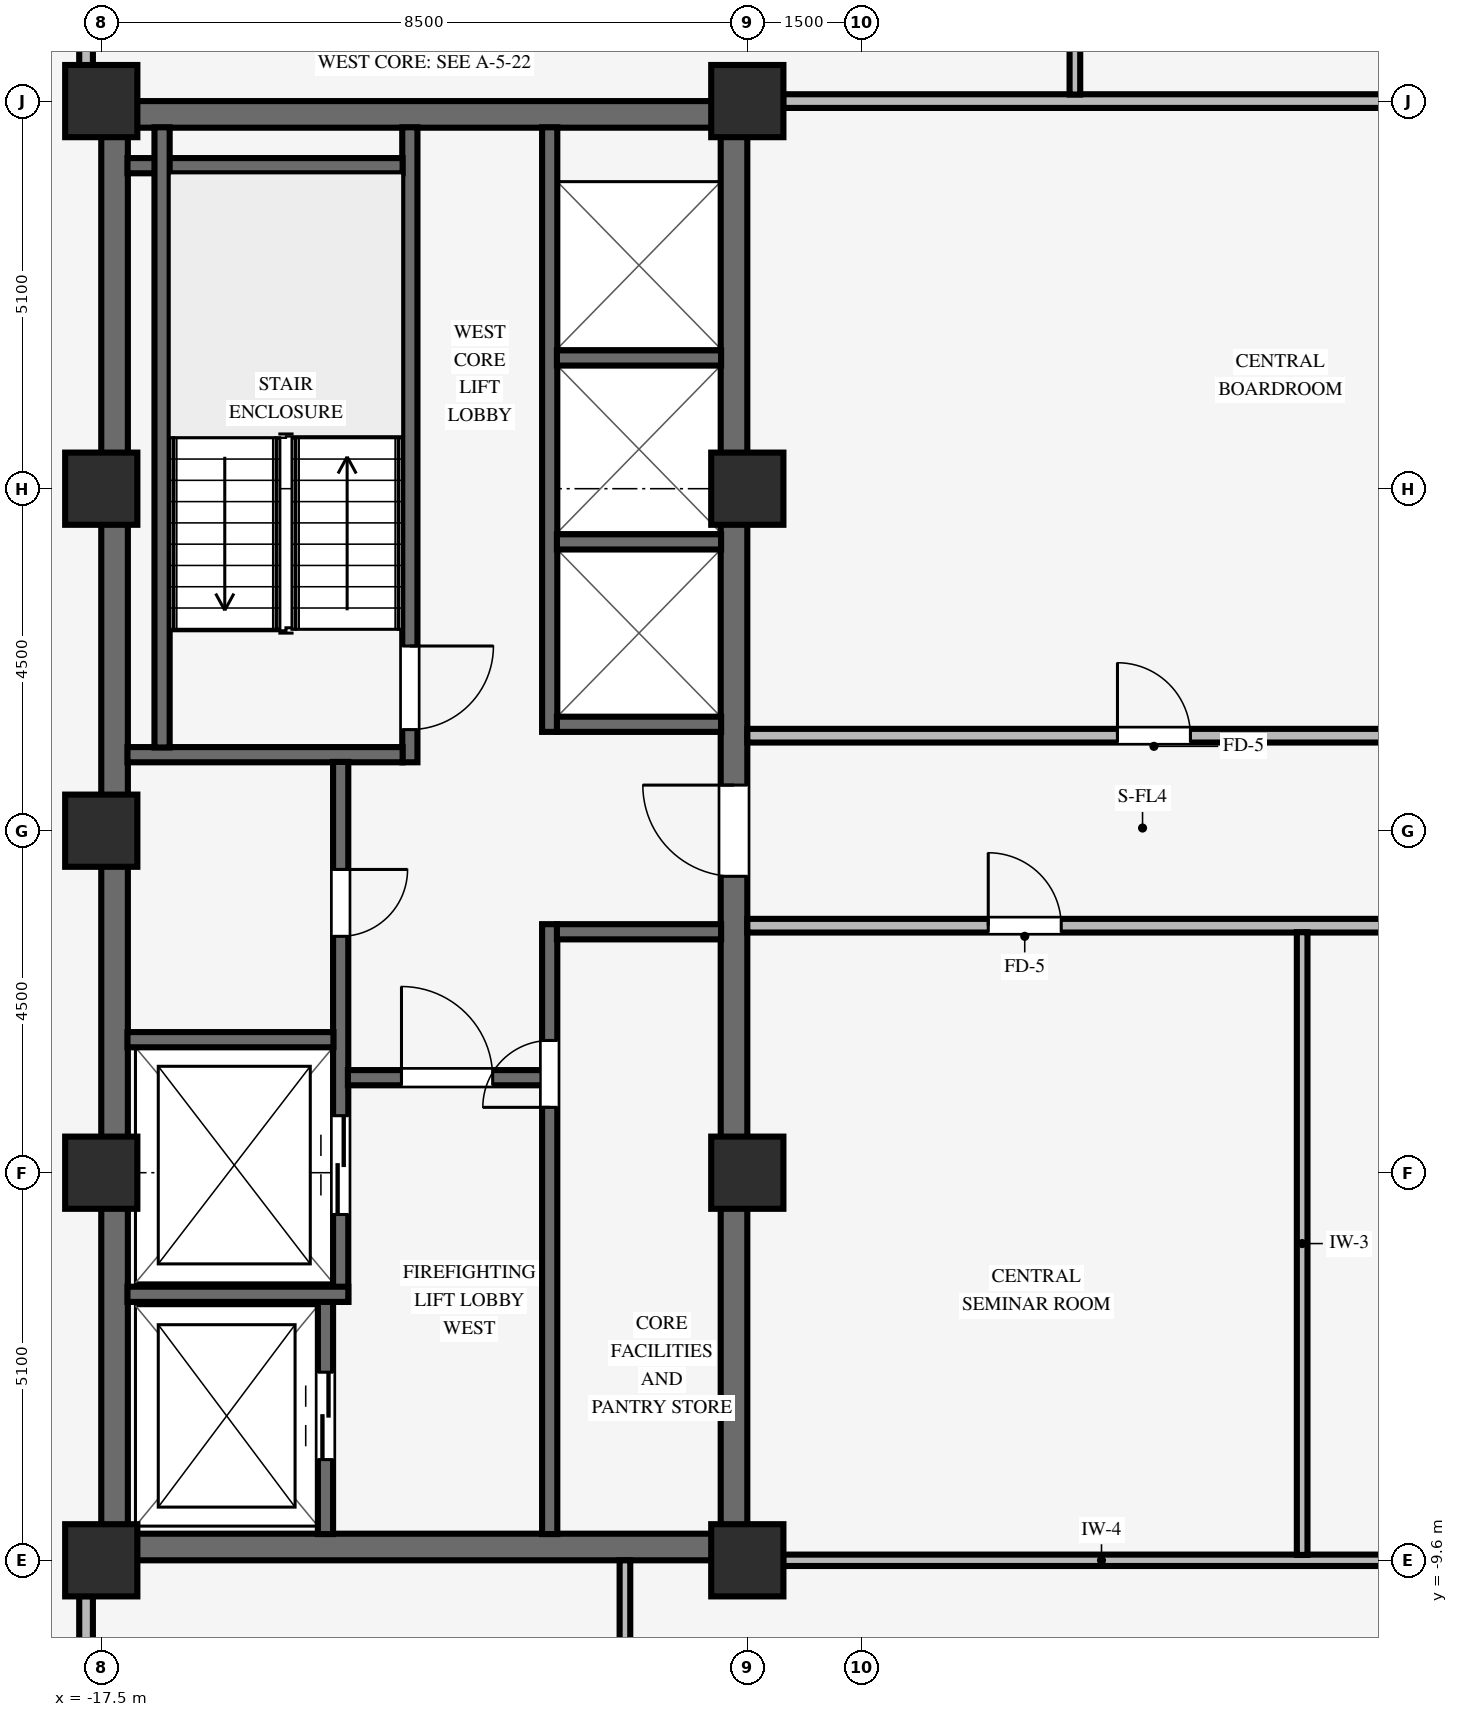
"""IFC4 building model, lengths in metres.
Left out: names, types, materials, properties, quantities, classifications, styles, units other than length and angle.
Written with IfcOpenShell. Run it as: python <this file> out.ifc"""

import sys

from ifc_helpers import new_model, si_unit, direction, frame, frame_2d, origin, origin_2d, place, context, subcontext, project, spatial, rectangle, extrude, source, transform, mapped, element, fill, save


model = new_model("IFC4")
c1 = context("Model", 3, precision=1e-05, world=origin(), true_north=direction((0.0, 1.0)))
c2 = subcontext(c1, "Body", "Model", "MODEL_VIEW")
j1 = project(units=[si_unit("LENGTHUNIT", "METRE"), si_unit("PLANEANGLEUNIT", "RADIAN")], contexts=[c1])
p1 = place(None, origin())
s1 = spatial("IfcSite", under=j1, at=p1, CompositionType="ELEMENT")
p2 = place(p1, origin())
s2 = spatial("IfcBuilding", under=s1, at=p2, CompositionType="ELEMENT")
p3 = place(p2, frame((0.0, 0.0, 212.8)))
s3 = spatial("IfcBuildingStorey", under=s2, at=p3, CompositionType="ELEMENT", Elevation=212.8)
for number, where, z_axis, x_axis in (
    (1, (-17.5, -9.425, 0.0), (0.0, 0.0, 1.0), (1.0, 0.0, 0.0)),
    (2, (-17.5, 9.425, 0.0), (0.0, 0.0, 1.0), (1.0, 0.0, 0.0)),
):
    element("IfcWall", number, at=place(p3, frame(where, z_axis=z_axis, x_axis=x_axis)), inside=s3, PredefinedType="SHEAR", context=c2, shape_type="SweptSolid", body=[
        extrude(rectangle(XDim=8.5, YDim=0.35, at=frame_2d((4.25, 0.0))), origin(), (0.0, 0.0, 1.0), 3.37),
    ])
p4 = place(p3, frame((-17.325, -9.255, 0.0), z_axis=(0.0, 0.0, 1.0), x_axis=(0.0, 1.0, 0.0)))
e3 = element("IfcWall", 3, at=p4, inside=s3, PredefinedType="SHEAR", context=c2, shape_type="SweptSolid", body=[
    extrude(rectangle(XDim=18.51, YDim=0.35, at=frame_2d((9.255, 0.0))), origin(), (0.0, 0.0, 1.0), 3.37),
])
p5 = place(p3, frame((-9.175, -9.255, 0.0), z_axis=(0.0, 0.0, 1.0), x_axis=(0.0, 1.0, 0.0)))
e4 = element("IfcWall", 4, at=p5, inside=s3, PredefinedType="SHEAR", context=c2, shape_type="SweptSolid", body=[
    extrude(rectangle(XDim=18.51, YDim=0.35, at=frame_2d((9.255, 0.0))), origin(), (0.0, 0.0, 1.0), 3.37),
])
p6 = place(p5, frame((8.655, 0.0, 0.0)))
e5 = element("IfcOpeningElement", 5, at=p6, cuts=e4, PredefinedType="OPENING", context=c2, shape_type="SweptSolid", body=[
    extrude(rectangle(XDim=1.2, YDim=2.15, at=frame_2d((0.6, 1.075))), frame((0.0, 0.185, 0.0), z_axis=(0.0, -1.0, 0.0), x_axis=(1.0, 0.0, 0.0)), (0.0, 0.0, 1.0), 0.37),
])
for number, where, z_axis, x_axis in (
    (6, (-17.5, -9.6, 0.0), (0.0, 0.0, 1.0), (1.0, 0.0, 0.0)),
    (7, (-17.5, -4.5, 0.0), (0.0, 0.0, 1.0), (1.0, 0.0, 0.0)),
    (8, (-17.5, 4.5, 0.0), (0.0, 0.0, 1.0), (1.0, 0.0, 0.0)),
    (9, (-17.5, 9.6, 0.0), (0.0, 0.0, 1.0), (1.0, 0.0, 0.0)),
    (10, (-9.0, -9.6, 0.0), (0.0, 0.0, 1.0), (1.0, 0.0, 0.0)),
    (11, (-9.0, -4.5, 0.0), (0.0, 0.0, 1.0), (1.0, 0.0, 0.0)),
    (12, (-9.0, 4.5, 0.0), (0.0, 0.0, 1.0), (1.0, 0.0, 0.0)),
    (13, (-9.0, 9.6, 0.0), (0.0, 0.0, 1.0), (1.0, 0.0, 0.0)),
    (14, (-17.5, 0.0, 0.0), (0.0, 0.0, 1.0), (1.0, 0.0, 0.0)),
):
    element("IfcColumn", number, at=place(p3, frame(where, z_axis=z_axis, x_axis=x_axis)), inside=s3, PredefinedType="COLUMN", context=c2, shape_type="SweptSolid", body=[
        extrude(rectangle(XDim=0.95, YDim=0.95, at=origin_2d()), origin(), (0.0, 0.0, 1.0), 3.37),
    ])
p7 = place(p3, frame((-13.44, 0.9, 0.0), z_axis=(0.0, 0.0, 1.0), x_axis=(0.0, 1.0, 0.0)))
e15 = element("IfcWall", 15, at=p7, inside=s3, PredefinedType="SHEAR", context=c2, shape_type="SweptSolid", body=[
    extrude(rectangle(XDim=8.355, YDim=0.2, at=frame_2d((4.177, 0.0))), origin(), (0.0, 0.0, 1.0), 3.37),
])
p8 = place(p7, frame((1.53, 0.0, 0.0), z_axis=(0.0, 0.0, 1.0), x_axis=(-1.0, 0.0, 0.0)))
e16 = element("IfcOpeningElement", 16, at=p8, cuts=e15, PredefinedType="OPENING", context=c2, shape_type="SweptSolid", body=[
    extrude(rectangle(XDim=1.1, YDim=2.15, at=frame_2d((0.55, 1.075))), frame((0.0, 0.11, 0.0), z_axis=(0.0, -1.0, 0.0), x_axis=(1.0, 0.0, 0.0)), (0.0, 0.0, 1.0), 0.22),
])
for number, where, z_axis, x_axis in (
    (17, (-17.155, 1.0, 0.0), (0.0, 0.0, 1.0), (1.0, 0.0, 0.0)),
    (18, (-17.155, 8.75, 0.0), (0.0, 0.0, 1.0), (1.0, 0.0, 0.0)),
):
    element("IfcWall", number, at=place(p3, frame(where, z_axis=z_axis, x_axis=x_axis)), inside=s3, PredefinedType="SHEAR", context=c2, shape_type="SweptSolid", body=[
        extrude(rectangle(XDim=3.62, YDim=0.2, at=frame_2d((1.81, 0.0))), origin(), (0.0, 0.0, 1.0), 3.37),
    ])
p9 = place(p3, frame((-16.7, 1.095, 0.0), z_axis=(0.0, 0.0, 1.0), x_axis=(0.0, 1.0, 0.0)))
e19 = element("IfcWall", 19, at=p9, inside=s3, PredefinedType="SHEAR", context=c2, shape_type="SweptSolid", body=[
    extrude(rectangle(XDim=8.16, YDim=0.2, at=frame_2d((4.08, 0.0))), origin(), (0.0, 0.0, 1.0), 3.37),
])
p10 = place(p3, frame((-14.55, -9.255, 0.0), z_axis=(0.0, 0.0, 1.0), x_axis=(0.0, 1.0, 0.0)))
e20 = element("IfcWall", 20, at=p10, inside=s3, PredefinedType="SHEAR", context=c2, shape_type="SweptSolid", body=[
    extrude(rectangle(XDim=3.06, YDim=0.2, at=frame_2d((1.53, 0.0))), origin(), (0.0, 0.0, 1.0), 3.37),
])
p11 = place(p10, frame((0.98, 0.0, 0.0)))
e21 = element("IfcOpeningElement", 21, at=p11, cuts=e20, PredefinedType="OPENING", context=c2, shape_type="SweptSolid", body=[
    extrude(rectangle(XDim=1.15, YDim=2.15, at=frame_2d((0.575, 1.075))), frame((0.0, 0.11, 0.0), z_axis=(0.0, -1.0, 0.0), x_axis=(1.0, 0.0, 0.0)), (0.0, 0.0, 1.0), 0.22),
])
p12 = place(p3, frame((-14.35, -6.2, 0.0), z_axis=(0.0, 0.0, 1.0), x_axis=(0.0, 1.0, 0.0)))
e22 = element("IfcWall", 22, at=p12, inside=s3, PredefinedType="SHEAR", context=c2, shape_type="SweptSolid", body=[
    extrude(rectangle(XDim=7.105, YDim=0.2, at=frame_2d((3.552, 0.0))), origin(), (0.0, 0.0, 1.0), 3.37),
])
p13 = place(p12, frame((5.69, 0.0, 0.0), z_axis=(0.0, 0.0, 1.0), x_axis=(-1.0, 0.0, 0.0)))
e23 = element("IfcOpeningElement", 23, at=p13, cuts=e22, PredefinedType="OPENING", context=c2, shape_type="SweptSolid", body=[
    extrude(rectangle(XDim=0.88, YDim=2.1, at=frame_2d((0.44, 1.05))), frame((0.0, 0.11, 0.0), z_axis=(0.0, -1.0, 0.0), x_axis=(1.0, 0.0, 0.0)), (0.0, 0.0, 1.0), 0.22),
])
p14 = place(p12, frame((1.15, 0.0, 0.0)))
e24 = element("IfcOpeningElement", 24, at=p14, cuts=e22, PredefinedType="OPENING", context=c2, shape_type="SweptSolid", body=[
    extrude(rectangle(XDim=1.3, YDim=2.2, at=frame_2d((0.65, 1.1))), frame((0.0, 0.11, 0.0), z_axis=(0.0, -1.0, 0.0), x_axis=(1.0, 0.0, 0.0)), (0.0, 0.0, 1.0), 0.22),
])
p15 = place(p3, frame((-17.155, -6.1, 0.0), z_axis=(0.0, 0.0, 1.0), x_axis=(1.0, 0.0, 0.0)))
e25 = element("IfcWall", 25, at=p15, inside=s3, PredefinedType="SHEAR", context=c2, shape_type="SweptSolid", body=[
    extrude(rectangle(XDim=2.905, YDim=0.2, at=frame_2d((1.453, 0.0))), origin(), (0.0, 0.0, 1.0), 3.37),
])
p16 = place(p3, frame((-17.155, -2.75, 0.0), z_axis=(0.0, 0.0, 1.0), x_axis=(1.0, 0.0, 0.0)))
e26 = element("IfcWall", 26, at=p16, inside=s3, PredefinedType="SHEAR", context=c2, shape_type="SweptSolid", body=[
    extrude(rectangle(XDim=2.71, YDim=0.2, at=frame_2d((1.355, 0.0))), origin(), (0.0, 0.0, 1.0), 3.37),
])
p17 = place(p3, frame((-11.6, -9.255, 0.0), z_axis=(0.0, 0.0, 1.0), x_axis=(0.0, 1.0, 0.0)))
e27 = element("IfcWall", 27, at=p17, inside=s3, PredefinedType="SHEAR", context=c2, shape_type="SweptSolid", body=[
    extrude(rectangle(XDim=8.025, YDim=0.2, at=frame_2d((4.012, 0.0))), origin(), (0.0, 0.0, 1.0), 3.37),
])
p18 = place(p17, frame((5.615, 0.0, 0.0)))
e28 = element("IfcOpeningElement", 28, at=p18, cuts=e27, PredefinedType="OPENING", context=c2, shape_type="SweptSolid", body=[
    extrude(rectangle(XDim=0.88, YDim=2.1, at=frame_2d((0.44, 1.05))), frame((0.0, 0.11, 0.0), z_axis=(0.0, -1.0, 0.0), x_axis=(1.0, 0.0, 0.0)), (0.0, 0.0, 1.0), 0.22),
])
p19 = place(p3, frame((-14.255, -3.25, 0.0), z_axis=(0.0, 0.0, 1.0), x_axis=(1.0, 0.0, 0.0)))
e29 = element("IfcWall", 29, at=p19, inside=s3, PredefinedType="SHEAR", context=c2, shape_type="SweptSolid", body=[
    extrude(rectangle(XDim=2.56, YDim=0.2, at=frame_2d((1.28, 0.0))), origin(), (0.0, 0.0, 1.0), 3.37),
])
p20 = place(p19, frame((0.705, 0.0, 0.0)))
e30 = element("IfcOpeningElement", 30, at=p20, cuts=e29, PredefinedType="OPENING", context=c2, shape_type="SweptSolid", body=[
    extrude(rectangle(XDim=1.2, YDim=2.15, at=frame_2d((0.6, 1.075))), frame((0.0, 0.11, 0.0), z_axis=(0.0, -1.0, 0.0), x_axis=(1.0, 0.0, 0.0)), (0.0, 0.0, 1.0), 0.22),
])
p21 = place(p3, frame((-11.505, -1.33, 0.0), z_axis=(0.0, 0.0, 1.0), x_axis=(1.0, 0.0, 0.0)))
e31 = element("IfcWall", 31, at=p21, inside=s3, PredefinedType="SHEAR", context=c2, shape_type="SweptSolid", body=[
    extrude(rectangle(XDim=2.16, YDim=0.2, at=frame_2d((1.08, 0.0))), origin(), (0.0, 0.0, 1.0), 3.37),
])
p22 = place(p3, frame((-11.6, 1.3, 0.0), z_axis=(0.0, 0.0, 1.0), x_axis=(0.0, 1.0, 0.0)))
e32 = element("IfcWall", 32, at=p22, inside=s3, PredefinedType="SHEAR", context=c2, shape_type="SweptSolid", body=[
    extrude(rectangle(XDim=7.955, YDim=0.2, at=frame_2d((3.978, 0.0))), origin(), (0.0, 0.0, 1.0), 3.37),
])
for number, where, z_axis, x_axis in (
    (33, (-11.505, 1.4, 0.0), (0.0, 0.0, 1.0), (1.0, 0.0, 0.0)),
    (34, (-11.505, 3.8, 0.0), (0.0, 0.0, 1.0), (1.0, 0.0, 0.0)),
    (35, (-11.505, 6.22, 0.0), (0.0, 0.0, 1.0), (1.0, 0.0, 0.0)),
):
    element("IfcWall", number, at=place(p3, frame(where, z_axis=z_axis, x_axis=x_axis)), inside=s3, PredefinedType="SHEAR", context=c2, shape_type="SweptSolid", body=[
        extrude(rectangle(XDim=2.16, YDim=0.2, at=frame_2d((1.08, 0.0))), origin(), (0.0, 0.0, 1.0), 3.37),
    ])
p23 = place(p3, frame((-8.529, -9.6, 0.0), z_axis=(0.0, 0.0, 1.0), x_axis=(1.0, 0.0, 0.0)))
e36 = element("IfcWall", 36, at=p23, inside=s3, PredefinedType="PARTITIONING", context=c2, shape_type="SweptSolid", body=[
    extrude(rectangle(XDim=8.378, YDim=0.15, at=frame_2d((4.189, 0.0))), origin(), (0.0, 0.0, 1.0), 2.405),
])
p24 = place(p3, frame((-9.0, -1.25, 0.0), z_axis=(0.0, 0.0, 1.0), x_axis=(1.0, 0.0, 0.0)))
e37 = element("IfcWall", 37, at=p24, inside=s3, PredefinedType="PARTITIONING", context=c2, shape_type="SweptSolid", body=[
    extrude(rectangle(XDim=15.6, YDim=0.18, at=frame_2d((7.8, 0.0))), origin(), (0.0, 0.0, 1.0), 3.36),
])
p25 = place(p24, frame((10.97, 0.0, 0.0)))
e38 = element("IfcOpeningElement", 38, at=p25, cuts=e37, PredefinedType="OPENING", context=c2, shape_type="SweptSolid", body=[
    extrude(rectangle(XDim=0.96, YDim=2.1, at=frame_2d((0.48, 1.05))), frame((0.0, 0.1, 0.0), z_axis=(0.0, -1.0, 0.0), x_axis=(1.0, 0.0, 0.0)), (0.0, 0.0, 1.0), 0.2),
])
p26 = place(p24, frame((3.17, 0.0, 0.0)))
e39 = element("IfcOpeningElement", 39, at=p26, cuts=e37, PredefinedType="OPENING", context=c2, shape_type="SweptSolid", body=[
    extrude(rectangle(XDim=0.96, YDim=2.1, at=frame_2d((0.48, 1.05))), frame((0.0, 0.1, 0.0), z_axis=(0.0, -1.0, 0.0), x_axis=(1.0, 0.0, 0.0)), (0.0, 0.0, 1.0), 0.2),
])
p27 = place(p3, frame((-9.0, 1.25, 0.0), z_axis=(0.0, 0.0, 1.0), x_axis=(1.0, 0.0, 0.0)))
e40 = element("IfcWall", 40, at=p27, inside=s3, PredefinedType="PARTITIONING", context=c2, shape_type="SweptSolid", body=[
    extrude(rectangle(XDim=15.6, YDim=0.18, at=frame_2d((7.8, 0.0))), origin(), (0.0, 0.0, 1.0), 3.36),
])
p28 = place(p27, frame((4.87, 0.0, 0.0)))
e41 = element("IfcOpeningElement", 41, at=p28, cuts=e40, PredefinedType="OPENING", context=c2, shape_type="SweptSolid", body=[
    extrude(rectangle(XDim=0.96, YDim=2.1, at=frame_2d((0.48, 1.05))), frame((0.0, 0.1, 0.0), z_axis=(0.0, -1.0, 0.0), x_axis=(1.0, 0.0, 0.0)), (0.0, 0.0, 1.0), 0.2),
])
p29 = place(p3, frame((-8.529, 9.6, 0.0), z_axis=(0.0, 0.0, 1.0), x_axis=(1.0, 0.0, 0.0)))
e42 = element("IfcWall", 42, at=p29, inside=s3, PredefinedType="PARTITIONING", context=c2, shape_type="SweptSolid", body=[
    extrude(rectangle(XDim=8.378, YDim=0.18, at=frame_2d((4.189, 0.0))), origin(), (0.0, 0.0, 1.0), 2.405),
])
for number, where, z_axis, x_axis in (
    (43, (-17.7, -13.414, 0.0), (0.0, 0.0, 1.0), (0.0, 1.0, 0.0)),
    (44, (-17.7, 10.071, 0.0), (0.0, 0.0, 1.0), (0.0, 1.0, 0.0)),
):
    element("IfcWall", number, at=place(p3, frame(where, z_axis=z_axis, x_axis=x_axis)), inside=s3, PredefinedType="PARTITIONING", context=c2, shape_type="SweptSolid", body=[
        extrude(rectangle(XDim=3.343, YDim=0.18, at=frame_2d((1.671, 0.0))), origin(), (0.0, 0.0, 1.0), 2.816),
    ])
p30 = place(p3, frame((-10.61, -13.414, 0.0), z_axis=(0.0, 0.0, 1.0), x_axis=(0.0, 1.0, 0.0)))
e45 = element("IfcWall", 45, at=p30, inside=s3, PredefinedType="PARTITIONING", context=c2, shape_type="SweptSolid", body=[
    extrude(rectangle(XDim=3.814, YDim=0.14, at=frame_2d((1.907, 0.0))), origin(), (0.0, 0.0, 1.0), 3.36),
])
p31 = place(p3, frame((-4.69, 9.686, 0.0), z_axis=(0.0, 0.0, 1.0), x_axis=(0.0, 1.0, 0.0)))
e46 = element("IfcWall", 46, at=p31, inside=s3, PredefinedType="PARTITIONING", context=c2, shape_type="SweptSolid", body=[
    extrude(rectangle(XDim=3.728, YDim=0.14, at=frame_2d((1.864, 0.0))), origin(), (0.0, 0.0, 1.0), 3.36),
])
p32 = place(p3, frame((-1.7, -9.529, 0.0), z_axis=(0.0, 0.0, 1.0), x_axis=(0.0, 1.0, 0.0)))
e47 = element("IfcWall", 47, at=p32, inside=s3, PredefinedType="PARTITIONING", context=c2, shape_type="SweptSolid", body=[
    extrude(rectangle(XDim=8.193, YDim=0.14, at=frame_2d((4.097, 0.0))), origin(), (0.0, 0.0, 1.0), 3.36),
])
m1 = source(origin(), c2, "Body", "SweptSolid", [
    extrude(rectangle(XDim=1.1, YDim=2.15, at=frame_2d((0.55, 1.075))), frame((0.0, 0.025, 0.0), z_axis=(0.0, -1.0, 0.0), x_axis=(1.0, 0.0, 0.0)), (0.0, 0.0, 1.0), 0.05),
])
p33 = place(p8, origin())
e48 = element("IfcDoor", 48, at=p33, inside=s3, OperationType="SINGLE_SWING_LEFT", PredefinedType="DOOR", context=c2, shape_type="MappedRepresentation", body=[
    mapped(m1, transform((0.0, 0.0, 0.0), scale=1.0)),
])
fill(e16, e48)
m2 = source(origin(), c2, "Body", "SweptSolid", [
    extrude(rectangle(XDim=0.88, YDim=2.1, at=frame_2d((0.44, 1.05))), frame((0.0, 0.025, 0.0), z_axis=(0.0, -1.0, 0.0), x_axis=(1.0, 0.0, 0.0)), (0.0, 0.0, 1.0), 0.05),
])
p34 = place(p13, origin())
e49 = element("IfcDoor", 49, at=p34, inside=s3, OperationType="SINGLE_SWING_LEFT", PredefinedType="DOOR", context=c2, shape_type="MappedRepresentation", body=[
    mapped(m2, transform((0.0, 0.0, 0.0), scale=1.0)),
])
fill(e23, e49)
m3 = source(origin(), c2, "Body", "SweptSolid", [
    extrude(rectangle(XDim=1.2, YDim=2.15, at=frame_2d((0.6, 1.075))), frame((0.0, 0.025, 0.0), z_axis=(0.0, -1.0, 0.0), x_axis=(1.0, 0.0, 0.0)), (0.0, 0.0, 1.0), 0.05),
])
p35 = place(p20, origin())
e50 = element("IfcDoor", 50, at=p35, inside=s3, OperationType="SINGLE_SWING_LEFT", PredefinedType="DOOR", context=c2, shape_type="MappedRepresentation", body=[
    mapped(m3, transform((0.0, 0.0, 0.0), scale=1.0)),
])
fill(e30, e50)
p36 = place(p18, origin())
e51 = element("IfcDoor", 51, at=p36, inside=s3, OperationType="SINGLE_SWING_LEFT", PredefinedType="DOOR", context=c2, shape_type="MappedRepresentation", body=[
    mapped(m2, transform((0.0, 0.0, 0.0), scale=1.0)),
])
fill(e28, e51)
p37 = place(p6, origin())
e52 = element("IfcDoor", 52, at=p37, inside=s3, OperationType="SINGLE_SWING_RIGHT", PredefinedType="DOOR", context=c2, shape_type="MappedRepresentation", body=[
    mapped(m3, transform((0.0, 0.0, 0.0), scale=1.0)),
])
fill(e5, e52)
m4 = source(origin(), c2, "Body", "SweptSolid", [
    extrude(rectangle(XDim=1.15, YDim=2.15, at=frame_2d((0.575, 1.075))), frame((0.0, 0.025, 0.0), z_axis=(0.0, -1.0, 0.0), x_axis=(1.0, 0.0, 0.0)), (0.0, 0.0, 1.0), 0.05),
])
p38 = place(p11, origin())
e53 = element("IfcDoor", 53, at=p38, inside=s3, OperationType="DOUBLE_DOOR_SLIDING", PredefinedType="DOOR", context=c2, shape_type="MappedRepresentation", body=[
    mapped(m4, transform((0.0, 0.0, 0.0), scale=1.0)),
])
fill(e21, e53)
m5 = source(origin(), c2, "Body", "SweptSolid", [
    extrude(rectangle(XDim=1.3, YDim=2.2, at=frame_2d((0.65, 1.1))), frame((0.0, 0.025, 0.0), z_axis=(0.0, -1.0, 0.0), x_axis=(1.0, 0.0, 0.0)), (0.0, 0.0, 1.0), 0.05),
])
p39 = place(p14, origin())
e54 = element("IfcDoor", 54, at=p39, inside=s3, OperationType="DOUBLE_DOOR_SLIDING", PredefinedType="DOOR", context=c2, shape_type="MappedRepresentation", body=[
    mapped(m5, transform((0.0, 0.0, 0.0), scale=1.0)),
])
fill(e24, e54)
m6 = source(origin(), c2, "Body", "SweptSolid", [
    extrude(rectangle(XDim=0.96, YDim=2.1, at=frame_2d((0.48, 1.05))), frame((0.0, 0.025, 0.0), z_axis=(0.0, -1.0, 0.0), x_axis=(1.0, 0.0, 0.0)), (0.0, 0.0, 1.0), 0.05),
])
p40 = place(p28, origin())
e55 = element("IfcDoor", 55, at=p40, inside=s3, OperationType="SINGLE_SWING_LEFT", PredefinedType="DOOR", context=c2, shape_type="MappedRepresentation", body=[
    mapped(m6, transform((0.0, 0.0, 0.0), scale=1.0)),
])
fill(e41, e55)
p41 = place(p26, origin())
e56 = element("IfcDoor", 56, at=p41, inside=s3, OperationType="SINGLE_SWING_LEFT", PredefinedType="DOOR", context=c2, shape_type="MappedRepresentation", body=[
    mapped(m6, transform((0.0, 0.0, 0.0), scale=1.0)),
])
fill(e39, e56)
save(model, sys.argv[1])
